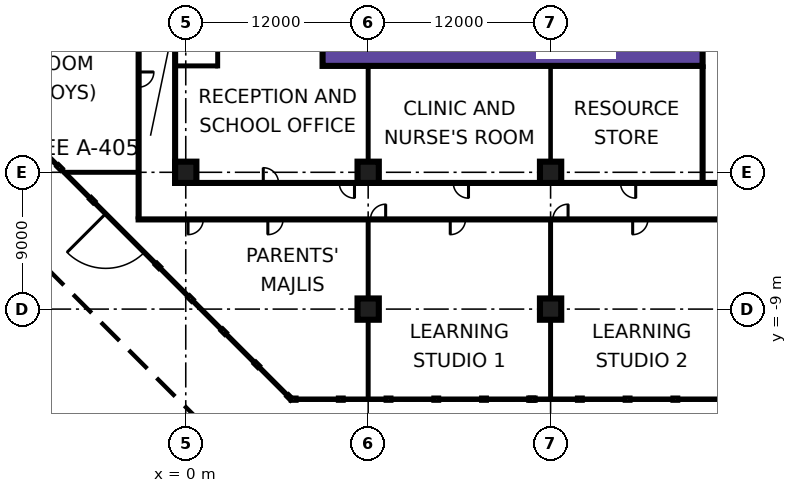
"""IFC4 building model, lengths in metres.
Left out: names, types, materials, properties, quantities, classifications, styles, units other than length and angle.
Written with IfcOpenShell. Run it as: python <this file> out.ifc"""

import sys

from ifc_helpers import new_model, si_unit, direction, frame, frame_2d, origin, origin_2d, place, context, subcontext, project, spatial, rectangle, extrude, element, fill, save


model = new_model("IFC4")
c1 = context("Model", 3, precision=1e-05, world=origin(), true_north=direction((0.0, 1.0)))
c2 = subcontext(c1, "Body", "Model", "MODEL_VIEW")
j1 = project(units=[si_unit("LENGTHUNIT", "METRE"), si_unit("PLANEANGLEUNIT", "RADIAN")], contexts=[c1])
p1 = place(None, origin())
s1 = spatial("IfcSite", under=j1, at=p1, CompositionType="ELEMENT")
p2 = place(p1, origin())
s2 = spatial("IfcBuilding", under=s1, at=p2, CompositionType="ELEMENT")
p3 = place(p2, origin())
s3 = spatial("IfcBuildingStorey", under=s2, at=p3, CompositionType="ELEMENT", Elevation=0.0)
for number, where, z_axis, x_axis in (
    (1, (12.0, -9.0, 0.0), (0.0, 0.0, 1.0), (1.0, 0.0, 0.0)),
    (2, (24.0, -9.0, 0.0), (0.0, 0.0, 1.0), (1.0, 0.0, 0.0)),
    (3, (0.0, 0.0, 0.0), (0.0, 0.0, 1.0), (1.0, 0.0, 0.0)),
    (4, (12.0, 0.0, 0.0), (0.0, 0.0, 1.0), (1.0, 0.0, 0.0)),
    (5, (24.0, 0.0, 0.0), (0.0, 0.0, 1.0), (1.0, 0.0, 0.0)),
):
    element("IfcColumn", number, at=place(p3, frame(where, z_axis=z_axis, x_axis=x_axis)), inside=s3, PredefinedType="COLUMN", context=c2, shape_type="SweptSolid", body=[
        extrude(rectangle(XDim=1.4, YDim=1.4, at=origin_2d()), origin(), (0.0, 0.0, 1.0), 7.2),
    ])
p4 = place(p3, frame((9.0, 7.6, 0.0), z_axis=(0.0, 0.0, 1.0), x_axis=(1.0, 0.0, 0.0)))
e6 = element("IfcWall", 6, at=p4, inside=s3, PredefinedType="SHEAR", context=c2, shape_type="SweptSolid", body=[
    extrude(rectangle(XDim=25.0, YDim=1.2, at=frame_2d((12.5, 0.0))), origin(), (0.0, 0.0, 1.0), 7.2),
])
p5 = place(p3, frame((-6.114, -1.872, 0.0), z_axis=(0.0, 0.0, 1.0), x_axis=(0.707106781187, -0.707106781187, 0.0)))
e7 = element("IfcWall", 7, at=p5, inside=s3, PredefinedType="SOLIDWALL", context=c2, shape_type="SweptSolid", body=[
    extrude(rectangle(XDim=6.0, YDim=0.15, at=frame_2d((3.0, 0.0))), origin(), (0.0, 0.0, 1.0), 6.8),
])
p6 = place(p5, frame((1.2, 0.0, 0.0)))
e8 = element("IfcOpeningElement", 8, at=p6, cuts=e7, PredefinedType="OPENING", context=c2, shape_type="SweptSolid", body=[
    extrude(rectangle(XDim=3.6, YDim=2.8, at=frame_2d((1.8, 1.4))), frame((0.0, 0.085, 0.0), z_axis=(0.0, -1.0, 0.0), x_axis=(1.0, 0.0, 0.0)), (0.0, 0.0, 1.0), 0.17),
])
p7 = place(p3, frame((-7.986, 0.0, 0.0), z_axis=(0.0, 0.0, 1.0), x_axis=(1.0, 0.0, 0.0)))
e9 = element("IfcWall", 9, at=p7, inside=s3, PredefinedType="PARTITIONING", context=c2, shape_type="SweptSolid", body=[
    extrude(rectangle(XDim=4.786, YDim=0.125, at=frame_2d((2.393, 0.0))), origin(), (0.0, 0.0, 1.0), 6.8),
])
p8 = place(p3, frame((-3.2, -3.1, 0.0), z_axis=(0.0, 0.0, 1.0), x_axis=(1.0, 0.0, 0.0)))
e10 = element("IfcWall", 10, at=p8, inside=s3, PredefinedType="PARTITIONING", context=c2, shape_type="SweptSolid", body=[
    extrude(rectangle(XDim=78.3, YDim=0.2, at=frame_2d((39.15, 0.0))), origin(), (0.0, 0.0, 1.0), 6.8),
])
p9 = place(p8, frame((70.1, 0.0, 0.0)))
e11 = element("IfcOpeningElement", 11, at=p9, cuts=e10, PredefinedType="OPENING", context=c2, shape_type="SweptSolid", body=[
    extrude(rectangle(XDim=1.0, YDim=2.1, at=frame_2d((0.5, 1.05))), frame((0.0, 0.11, 0.0), z_axis=(0.0, -1.0, 0.0), x_axis=(1.0, 0.0, 0.0)), (0.0, 0.0, 1.0), 0.22),
])
p10 = place(p8, frame((66.35, 0.0, 0.0)))
e12 = element("IfcOpeningElement", 12, at=p10, cuts=e10, PredefinedType="OPENING", context=c2, shape_type="SweptSolid", body=[
    extrude(rectangle(XDim=1.0, YDim=2.1, at=frame_2d((0.5, 1.05))), frame((0.0, 0.11, 0.0), z_axis=(0.0, -1.0, 0.0), x_axis=(1.0, 0.0, 0.0)), (0.0, 0.0, 1.0), 0.22),
])
p11 = place(p8, frame((76.35, 0.0, 0.0)))
e13 = element("IfcOpeningElement", 13, at=p11, cuts=e10, PredefinedType="OPENING", context=c2, shape_type="SweptSolid", body=[
    extrude(rectangle(XDim=1.0, YDim=2.1, at=frame_2d((0.5, 1.05))), frame((0.0, 0.11, 0.0), z_axis=(0.0, -1.0, 0.0), x_axis=(1.0, 0.0, 0.0)), (0.0, 0.0, 1.0), 0.22),
])
p12 = place(p8, frame((8.6, 0.0, 0.0)))
e14 = element("IfcOpeningElement", 14, at=p12, cuts=e10, PredefinedType="OPENING", context=c2, shape_type="SweptSolid", body=[
    extrude(rectangle(XDim=1.0, YDim=2.1, at=frame_2d((0.5, 1.05))), frame((0.0, 0.11, 0.0), z_axis=(0.0, -1.0, 0.0), x_axis=(1.0, 0.0, 0.0)), (0.0, 0.0, 1.0), 0.22),
])
p13 = place(p8, frame((3.35, 0.0, 0.0)))
e15 = element("IfcOpeningElement", 15, at=p13, cuts=e10, PredefinedType="OPENING", context=c2, shape_type="SweptSolid", body=[
    extrude(rectangle(XDim=1.0, YDim=2.1, at=frame_2d((0.5, 1.05))), frame((0.0, 0.11, 0.0), z_axis=(0.0, -1.0, 0.0), x_axis=(1.0, 0.0, 0.0)), (0.0, 0.0, 1.0), 0.22),
])
p14 = place(p8, frame((20.6, 0.0, 0.0)))
e16 = element("IfcOpeningElement", 16, at=p14, cuts=e10, PredefinedType="OPENING", context=c2, shape_type="SweptSolid", body=[
    extrude(rectangle(XDim=1.0, YDim=2.1, at=frame_2d((0.5, 1.05))), frame((0.0, 0.11, 0.0), z_axis=(0.0, -1.0, 0.0), x_axis=(1.0, 0.0, 0.0)), (0.0, 0.0, 1.0), 0.22),
])
p15 = place(p8, frame((15.35, 0.0, 0.0)))
e17 = element("IfcOpeningElement", 17, at=p15, cuts=e10, PredefinedType="OPENING", context=c2, shape_type="SweptSolid", body=[
    extrude(rectangle(XDim=1.0, YDim=2.1, at=frame_2d((0.5, 1.05))), frame((0.0, 0.11, 0.0), z_axis=(0.0, -1.0, 0.0), x_axis=(1.0, 0.0, 0.0)), (0.0, 0.0, 1.0), 0.22),
])
p16 = place(p8, frame((32.6, 0.0, 0.0)))
e18 = element("IfcOpeningElement", 18, at=p16, cuts=e10, PredefinedType="OPENING", context=c2, shape_type="SweptSolid", body=[
    extrude(rectangle(XDim=1.0, YDim=2.1, at=frame_2d((0.5, 1.05))), frame((0.0, 0.11, 0.0), z_axis=(0.0, -1.0, 0.0), x_axis=(1.0, 0.0, 0.0)), (0.0, 0.0, 1.0), 0.22),
])
p17 = place(p8, frame((27.35, 0.0, 0.0)))
e19 = element("IfcOpeningElement", 19, at=p17, cuts=e10, PredefinedType="OPENING", context=c2, shape_type="SweptSolid", body=[
    extrude(rectangle(XDim=1.0, YDim=2.1, at=frame_2d((0.5, 1.05))), frame((0.0, 0.11, 0.0), z_axis=(0.0, -1.0, 0.0), x_axis=(1.0, 0.0, 0.0)), (0.0, 0.0, 1.0), 0.22),
])
p18 = place(p8, frame((44.85, 0.0, 0.0)))
e20 = element("IfcOpeningElement", 20, at=p18, cuts=e10, PredefinedType="OPENING", context=c2, shape_type="SweptSolid", body=[
    extrude(rectangle(XDim=1.8, YDim=2.1, at=frame_2d((0.9, 1.05))), frame((0.0, 0.11, 0.0), z_axis=(0.0, -1.0, 0.0), x_axis=(1.0, 0.0, 0.0)), (0.0, 0.0, 1.0), 0.22),
])
p19 = place(p8, frame((50.15, 0.0, 0.0)))
e21 = element("IfcOpeningElement", 21, at=p19, cuts=e10, PredefinedType="OPENING", context=c2, shape_type="SweptSolid", body=[
    extrude(rectangle(XDim=1.8, YDim=2.1, at=frame_2d((0.9, 1.05))), frame((0.0, 0.11, 0.0), z_axis=(0.0, -1.0, 0.0), x_axis=(1.0, 0.0, 0.0)), (0.0, 0.0, 1.0), 0.22),
])
p20 = place(p8, frame((53.75, 0.0, 0.0)))
e22 = element("IfcOpeningElement", 22, at=p20, cuts=e10, PredefinedType="OPENING", context=c2, shape_type="SweptSolid", body=[
    extrude(rectangle(XDim=1.8, YDim=2.1, at=frame_2d((0.9, 1.05))), frame((0.0, 0.11, 0.0), z_axis=(0.0, -1.0, 0.0), x_axis=(1.0, 0.0, 0.0)), (0.0, 0.0, 1.0), 0.22),
])
p21 = place(p3, frame((-3.1, -3.0, 0.0), z_axis=(0.0, 0.0, 1.0), x_axis=(0.0, 1.0, 0.0)))
e23 = element("IfcWall", 23, at=p21, inside=s3, PredefinedType="PARTITIONING", context=c2, shape_type="SweptSolid", body=[
    extrude(rectangle(XDim=69.1, YDim=0.2, at=frame_2d((34.55, 0.0))), origin(), (0.0, 0.0, 1.0), 6.8),
])
p22 = place(p21, frame((8.6, 0.0, 0.0)))
e24 = element("IfcOpeningElement", 24, at=p22, cuts=e23, PredefinedType="OPENING", context=c2, shape_type="SweptSolid", body=[
    extrude(rectangle(XDim=1.0, YDim=2.1, at=frame_2d((0.5, 1.05))), frame((0.0, 0.11, 0.0), z_axis=(0.0, -1.0, 0.0), x_axis=(1.0, 0.0, 0.0)), (0.0, 0.0, 1.0), 0.22),
])
p23 = place(p21, frame((13.85, 0.0, 0.0)))
e25 = element("IfcOpeningElement", 25, at=p23, cuts=e23, PredefinedType="OPENING", context=c2, shape_type="SweptSolid", body=[
    extrude(rectangle(XDim=1.0, YDim=2.1, at=frame_2d((0.5, 1.05))), frame((0.0, 0.11, 0.0), z_axis=(0.0, -1.0, 0.0), x_axis=(1.0, 0.0, 0.0)), (0.0, 0.0, 1.0), 0.22),
])
p24 = place(p21, frame((18.6, 0.0, 0.0)))
e26 = element("IfcOpeningElement", 26, at=p24, cuts=e23, PredefinedType="OPENING", context=c2, shape_type="SweptSolid", body=[
    extrude(rectangle(XDim=1.0, YDim=2.1, at=frame_2d((0.5, 1.05))), frame((0.0, 0.11, 0.0), z_axis=(0.0, -1.0, 0.0), x_axis=(1.0, 0.0, 0.0)), (0.0, 0.0, 1.0), 0.22),
])
p25 = place(p21, frame((66.95, 0.0, 0.0)))
e27 = element("IfcOpeningElement", 27, at=p25, cuts=e23, PredefinedType="OPENING", context=c2, shape_type="SweptSolid", body=[
    extrude(rectangle(XDim=1.0, YDim=2.1, at=frame_2d((0.5, 1.05))), frame((0.0, 0.11, 0.0), z_axis=(0.0, -1.0, 0.0), x_axis=(1.0, 0.0, 0.0)), (0.0, 0.0, 1.0), 0.22),
])
p26 = place(p21, frame((59.85, 0.0, 0.0)))
e28 = element("IfcOpeningElement", 28, at=p26, cuts=e23, PredefinedType="OPENING", context=c2, shape_type="SweptSolid", body=[
    extrude(rectangle(XDim=1.8, YDim=2.1, at=frame_2d((0.9, 1.05))), frame((0.0, 0.11, 0.0), z_axis=(0.0, -1.0, 0.0), x_axis=(1.0, 0.0, 0.0)), (0.0, 0.0, 1.0), 0.22),
])
p27 = place(p21, frame((49.85, 0.0, 0.0)))
e29 = element("IfcOpeningElement", 29, at=p27, cuts=e23, PredefinedType="OPENING", context=c2, shape_type="SweptSolid", body=[
    extrude(rectangle(XDim=1.8, YDim=2.1, at=frame_2d((0.9, 1.05))), frame((0.0, 0.11, 0.0), z_axis=(0.0, -1.0, 0.0), x_axis=(1.0, 0.0, 0.0)), (0.0, 0.0, 1.0), 0.22),
])
p28 = place(p21, frame((29.85, 0.0, 0.0)))
e30 = element("IfcOpeningElement", 30, at=p28, cuts=e23, PredefinedType="OPENING", context=c2, shape_type="SweptSolid", body=[
    extrude(rectangle(XDim=1.8, YDim=2.1, at=frame_2d((0.9, 1.05))), frame((0.0, 0.11, 0.0), z_axis=(0.0, -1.0, 0.0), x_axis=(1.0, 0.0, 0.0)), (0.0, 0.0, 1.0), 0.22),
])
p29 = place(p21, frame((39.6, 0.0, 0.0)))
e31 = element("IfcOpeningElement", 31, at=p29, cuts=e23, PredefinedType="OPENING", context=c2, shape_type="SweptSolid", body=[
    extrude(rectangle(XDim=1.8, YDim=2.1, at=frame_2d((0.9, 1.05))), frame((0.0, 0.11, 0.0), z_axis=(0.0, -1.0, 0.0), x_axis=(1.0, 0.0, 0.0)), (0.0, 0.0, 1.0), 0.22),
])
p30 = place(p21, frame((23.55, 0.0, 0.0)))
e32 = element("IfcOpeningElement", 32, at=p30, cuts=e23, PredefinedType="OPENING", context=c2, shape_type="SweptSolid", body=[
    extrude(rectangle(XDim=1.8, YDim=2.1, at=frame_2d((0.9, 1.05))), frame((0.0, 0.11, 0.0), z_axis=(0.0, -1.0, 0.0), x_axis=(1.0, 0.0, 0.0)), (0.0, 0.0, 1.0), 0.22),
])
p31 = place(p3, frame((-0.8, -0.7, 0.0), z_axis=(0.0, 0.0, 1.0), x_axis=(1.0, 0.0, 0.0)))
e33 = element("IfcWall", 33, at=p31, inside=s3, PredefinedType="PARTITIONING", context=c2, shape_type="SweptSolid", body=[
    extrude(rectangle(XDim=46.5, YDim=0.2, at=frame_2d((23.25, 0.0))), origin(), (0.0, 0.0, 1.0), 6.8),
])
p32 = place(p31, frame((39.85, 0.0, 0.0)))
e34 = element("IfcOpeningElement", 34, at=p32, cuts=e33, PredefinedType="OPENING", context=c2, shape_type="SweptSolid", body=[
    extrude(rectangle(XDim=1.8, YDim=2.1, at=frame_2d((0.9, 1.05))), frame((0.0, 0.11, 0.0), z_axis=(0.0, -1.0, 0.0), x_axis=(1.0, 0.0, 0.0)), (0.0, 0.0, 1.0), 0.22),
])
p33 = place(p31, frame((5.9, 0.0, 0.0)))
e35 = element("IfcOpeningElement", 35, at=p33, cuts=e33, PredefinedType="OPENING", context=c2, shape_type="SweptSolid", body=[
    extrude(rectangle(XDim=1.0, YDim=2.1, at=frame_2d((0.5, 1.05))), frame((0.0, 0.11, 0.0), z_axis=(0.0, -1.0, 0.0), x_axis=(1.0, 0.0, 0.0)), (0.0, 0.0, 1.0), 0.22),
])
p34 = place(p31, frame((10.9, 0.0, 0.0)))
e36 = element("IfcOpeningElement", 36, at=p34, cuts=e33, PredefinedType="OPENING", context=c2, shape_type="SweptSolid", body=[
    extrude(rectangle(XDim=1.0, YDim=2.1, at=frame_2d((0.5, 1.05))), frame((0.0, 0.11, 0.0), z_axis=(0.0, -1.0, 0.0), x_axis=(1.0, 0.0, 0.0)), (0.0, 0.0, 1.0), 0.22),
])
p35 = place(p31, frame((18.4, 0.0, 0.0)))
e37 = element("IfcOpeningElement", 37, at=p35, cuts=e33, PredefinedType="OPENING", context=c2, shape_type="SweptSolid", body=[
    extrude(rectangle(XDim=1.0, YDim=2.1, at=frame_2d((0.5, 1.05))), frame((0.0, 0.11, 0.0), z_axis=(0.0, -1.0, 0.0), x_axis=(1.0, 0.0, 0.0)), (0.0, 0.0, 1.0), 0.22),
])
p36 = place(p31, frame((29.4, 0.0, 0.0)))
e38 = element("IfcOpeningElement", 38, at=p36, cuts=e33, PredefinedType="OPENING", context=c2, shape_type="SweptSolid", body=[
    extrude(rectangle(XDim=1.0, YDim=2.1, at=frame_2d((0.5, 1.05))), frame((0.0, 0.11, 0.0), z_axis=(0.0, -1.0, 0.0), x_axis=(1.0, 0.0, 0.0)), (0.0, 0.0, 1.0), 0.22),
])
p37 = place(p3, frame((-0.7, -0.6, 0.0), z_axis=(0.0, 0.0, 1.0), x_axis=(0.0, 1.0, 0.0)))
e39 = element("IfcWall", 39, at=p37, inside=s3, PredefinedType="PARTITIONING", context=c2, shape_type="SweptSolid", body=[
    extrude(rectangle(XDim=23.6, YDim=0.2, at=frame_2d((11.8, 0.0))), origin(), (0.0, 0.0, 1.0), 6.8),
])
p38 = place(p37, frame((21.25, 0.0, 0.0)))
e40 = element("IfcOpeningElement", 40, at=p38, cuts=e39, PredefinedType="OPENING", context=c2, shape_type="SweptSolid", body=[
    extrude(rectangle(XDim=1.8, YDim=2.1, at=frame_2d((0.9, 1.05))), frame((0.0, 0.11, 0.0), z_axis=(0.0, -1.0, 0.0), x_axis=(1.0, 0.0, 0.0)), (0.0, 0.0, 1.0), 0.22),
])
p39 = place(p37, frame((13.5, 0.0, 0.0)))
e41 = element("IfcOpeningElement", 41, at=p39, cuts=e39, PredefinedType="OPENING", context=c2, shape_type="SweptSolid", body=[
    extrude(rectangle(XDim=1.0, YDim=2.1, at=frame_2d((0.5, 1.05))), frame((0.0, 0.11, 0.0), z_axis=(0.0, -1.0, 0.0), x_axis=(1.0, 0.0, 0.0)), (0.0, 0.0, 1.0), 0.22),
])
p40 = place(p3, frame((-0.6, 7.0, 0.0), z_axis=(0.0, 0.0, 1.0), x_axis=(1.0, 0.0, 0.0)))
e42 = element("IfcWall", 42, at=p40, inside=s3, PredefinedType="PARTITIONING", context=c2, shape_type="SweptSolid", body=[
    extrude(rectangle(XDim=2.638, YDim=0.125, at=frame_2d((1.319, 0.0))), origin(), (0.0, 0.0, 1.0), 6.8),
])
p41 = place(p3, frame((2.1, 6.938, 0.0), z_axis=(0.0, 0.0, 1.0), x_axis=(0.0, 1.0, 0.0)))
e43 = element("IfcWall", 43, at=p41, inside=s3, PredefinedType="PARTITIONING", context=c2, shape_type="SweptSolid", body=[
    extrude(rectangle(XDim=6.062, YDim=0.125, at=frame_2d((3.031, 0.0))), origin(), (0.0, 0.0, 1.0), 6.8),
])
p42 = place(p3, frame((12.0, -14.925, 0.0), z_axis=(0.0, 0.0, 1.0), x_axis=(0.0, 1.0, 0.0)))
e44 = element("IfcWall", 44, at=p42, inside=s3, PredefinedType="PARTITIONING", context=c2, shape_type="SweptSolid", body=[
    extrude(rectangle(XDim=11.725, YDim=0.125, at=frame_2d((5.863, 0.0))), origin(), (0.0, 0.0, 1.0), 6.8),
])
p43 = place(p3, frame((12.0, -0.6, 0.0), z_axis=(0.0, 0.0, 1.0), x_axis=(0.0, 1.0, 0.0)))
e45 = element("IfcWall", 45, at=p43, inside=s3, PredefinedType="PARTITIONING", context=c2, shape_type="SweptSolid", body=[
    extrude(rectangle(XDim=7.6, YDim=0.125, at=frame_2d((3.8, 0.0))), origin(), (0.0, 0.0, 1.0), 6.8),
])
p44 = place(p3, frame((24.0, -14.925, 0.0), z_axis=(0.0, 0.0, 1.0), x_axis=(0.0, 1.0, 0.0)))
e46 = element("IfcWall", 46, at=p44, inside=s3, PredefinedType="PARTITIONING", context=c2, shape_type="SweptSolid", body=[
    extrude(rectangle(XDim=11.725, YDim=0.125, at=frame_2d((5.863, 0.0))), origin(), (0.0, 0.0, 1.0), 6.8),
])
p45 = place(p3, frame((24.0, -0.6, 0.0), z_axis=(0.0, 0.0, 1.0), x_axis=(0.0, 1.0, 0.0)))
e47 = element("IfcWall", 47, at=p45, inside=s3, PredefinedType="PARTITIONING", context=c2, shape_type="SweptSolid", body=[
    extrude(rectangle(XDim=7.6, YDim=0.1, at=frame_2d((3.8, 0.0))), origin(), (0.0, 0.0, 1.0), 6.8),
])
p46 = place(p3, frame((34.0, -0.6, 0.0), z_axis=(0.0, 0.0, 1.0), x_axis=(0.0, 1.0, 0.0)))
e48 = element("IfcWall", 48, at=p46, inside=s3, PredefinedType="PARTITIONING", context=c2, shape_type="SweptSolid", body=[
    extrude(rectangle(XDim=7.6, YDim=0.2, at=frame_2d((3.8, 0.0))), origin(), (0.0, 0.0, 1.0), 6.8),
])
p47 = place(p6, frame((3.6, 0.0, 0.0), z_axis=(0.0, 0.0, 1.0), x_axis=(-1.0, 0.0, 0.0)))
e49 = element("IfcDoor", 49, at=p47, inside=s3, OperationType="DOUBLE_DOOR_SINGLE_SWING", PredefinedType="DOOR", context=c2, shape_type="SweptSolid", body=[
    extrude(rectangle(XDim=3.6, YDim=2.8, at=frame_2d((1.8, 1.4))), frame((0.0, 0.025, 0.0), z_axis=(0.0, -1.0, 0.0), x_axis=(1.0, 0.0, 0.0)), (0.0, 0.0, 1.0), 0.05),
])
fill(e8, e49)
p48 = place(p33, origin())
e50 = element("IfcDoor", 50, at=p48, inside=s3, OperationType="SINGLE_SWING_LEFT", PredefinedType="DOOR", context=c2, shape_type="SweptSolid", body=[
    extrude(rectangle(XDim=1.0, YDim=2.1, at=frame_2d((0.5, 1.05))), frame((0.0, 0.025, 0.0), z_axis=(0.0, -1.0, 0.0), x_axis=(1.0, 0.0, 0.0)), (0.0, 0.0, 1.0), 0.05),
])
fill(e35, e50)
p49 = place(p34, origin())
e51 = element("IfcDoor", 51, at=p49, inside=s3, OperationType="SINGLE_SWING_RIGHT", PredefinedType="DOOR", context=c2, shape_type="SweptSolid", body=[
    extrude(rectangle(XDim=1.0, YDim=2.1, at=frame_2d((0.5, 1.05))), frame((0.0, 0.025, 0.0), z_axis=(0.0, -1.0, 0.0), x_axis=(1.0, 0.0, 0.0)), (0.0, 0.0, 1.0), 0.05),
])
fill(e36, e51)
p50 = place(p35, origin())
e52 = element("IfcDoor", 52, at=p50, inside=s3, OperationType="SINGLE_SWING_RIGHT", PredefinedType="DOOR", context=c2, shape_type="SweptSolid", body=[
    extrude(rectangle(XDim=1.0, YDim=2.1, at=frame_2d((0.5, 1.05))), frame((0.0, 0.025, 0.0), z_axis=(0.0, -1.0, 0.0), x_axis=(1.0, 0.0, 0.0)), (0.0, 0.0, 1.0), 0.05),
])
fill(e37, e52)
p51 = place(p36, origin())
e53 = element("IfcDoor", 53, at=p51, inside=s3, OperationType="SINGLE_SWING_RIGHT", PredefinedType="DOOR", context=c2, shape_type="SweptSolid", body=[
    extrude(rectangle(XDim=1.0, YDim=2.1, at=frame_2d((0.5, 1.05))), frame((0.0, 0.025, 0.0), z_axis=(0.0, -1.0, 0.0), x_axis=(1.0, 0.0, 0.0)), (0.0, 0.0, 1.0), 0.05),
])
fill(e38, e53)
p52 = place(p12, frame((1.0, 0.0, 0.0), z_axis=(0.0, 0.0, 1.0), x_axis=(-1.0, 0.0, 0.0)))
e54 = element("IfcDoor", 54, at=p52, inside=s3, OperationType="SINGLE_SWING_LEFT", PredefinedType="DOOR", context=c2, shape_type="SweptSolid", body=[
    extrude(rectangle(XDim=1.0, YDim=2.1, at=frame_2d((0.5, 1.05))), frame((0.0, 0.025, 0.0), z_axis=(0.0, -1.0, 0.0), x_axis=(1.0, 0.0, 0.0)), (0.0, 0.0, 1.0), 0.05),
])
fill(e14, e54)
p53 = place(p13, frame((1.0, 0.0, 0.0), z_axis=(0.0, 0.0, 1.0), x_axis=(-1.0, 0.0, 0.0)))
e55 = element("IfcDoor", 55, at=p53, inside=s3, OperationType="SINGLE_SWING_LEFT", PredefinedType="DOOR", context=c2, shape_type="SweptSolid", body=[
    extrude(rectangle(XDim=1.0, YDim=2.1, at=frame_2d((0.5, 1.05))), frame((0.0, 0.025, 0.0), z_axis=(0.0, -1.0, 0.0), x_axis=(1.0, 0.0, 0.0)), (0.0, 0.0, 1.0), 0.05),
])
fill(e15, e55)
p54 = place(p14, frame((1.0, 0.0, 0.0), z_axis=(0.0, 0.0, 1.0), x_axis=(-1.0, 0.0, 0.0)))
e56 = element("IfcDoor", 56, at=p54, inside=s3, OperationType="SINGLE_SWING_LEFT", PredefinedType="DOOR", context=c2, shape_type="SweptSolid", body=[
    extrude(rectangle(XDim=1.0, YDim=2.1, at=frame_2d((0.5, 1.05))), frame((0.0, 0.025, 0.0), z_axis=(0.0, -1.0, 0.0), x_axis=(1.0, 0.0, 0.0)), (0.0, 0.0, 1.0), 0.05),
])
fill(e16, e56)
p55 = place(p15, frame((1.0, 0.0, 0.0), z_axis=(0.0, 0.0, 1.0), x_axis=(-1.0, 0.0, 0.0)))
e57 = element("IfcDoor", 57, at=p55, inside=s3, OperationType="SINGLE_SWING_RIGHT", PredefinedType="DOOR", context=c2, shape_type="SweptSolid", body=[
    extrude(rectangle(XDim=1.0, YDim=2.1, at=frame_2d((0.5, 1.05))), frame((0.0, 0.025, 0.0), z_axis=(0.0, -1.0, 0.0), x_axis=(1.0, 0.0, 0.0)), (0.0, 0.0, 1.0), 0.05),
])
fill(e17, e57)
p56 = place(p16, frame((1.0, 0.0, 0.0), z_axis=(0.0, 0.0, 1.0), x_axis=(-1.0, 0.0, 0.0)))
e58 = element("IfcDoor", 58, at=p56, inside=s3, OperationType="SINGLE_SWING_LEFT", PredefinedType="DOOR", context=c2, shape_type="SweptSolid", body=[
    extrude(rectangle(XDim=1.0, YDim=2.1, at=frame_2d((0.5, 1.05))), frame((0.0, 0.025, 0.0), z_axis=(0.0, -1.0, 0.0), x_axis=(1.0, 0.0, 0.0)), (0.0, 0.0, 1.0), 0.05),
])
fill(e18, e58)
p57 = place(p17, frame((1.0, 0.0, 0.0), z_axis=(0.0, 0.0, 1.0), x_axis=(-1.0, 0.0, 0.0)))
e59 = element("IfcDoor", 59, at=p57, inside=s3, OperationType="SINGLE_SWING_RIGHT", PredefinedType="DOOR", context=c2, shape_type="SweptSolid", body=[
    extrude(rectangle(XDim=1.0, YDim=2.1, at=frame_2d((0.5, 1.05))), frame((0.0, 0.025, 0.0), z_axis=(0.0, -1.0, 0.0), x_axis=(1.0, 0.0, 0.0)), (0.0, 0.0, 1.0), 0.05),
])
fill(e19, e59)
p58 = place(p22, origin())
e60 = element("IfcDoor", 60, at=p58, inside=s3, OperationType="SINGLE_SWING_RIGHT", PredefinedType="DOOR", context=c2, shape_type="SweptSolid", body=[
    extrude(rectangle(XDim=1.0, YDim=2.1, at=frame_2d((0.5, 1.05))), frame((0.0, 0.025, 0.0), z_axis=(0.0, -1.0, 0.0), x_axis=(1.0, 0.0, 0.0)), (0.0, 0.0, 1.0), 0.05),
])
fill(e24, e60)
save(model, sys.argv[1])
